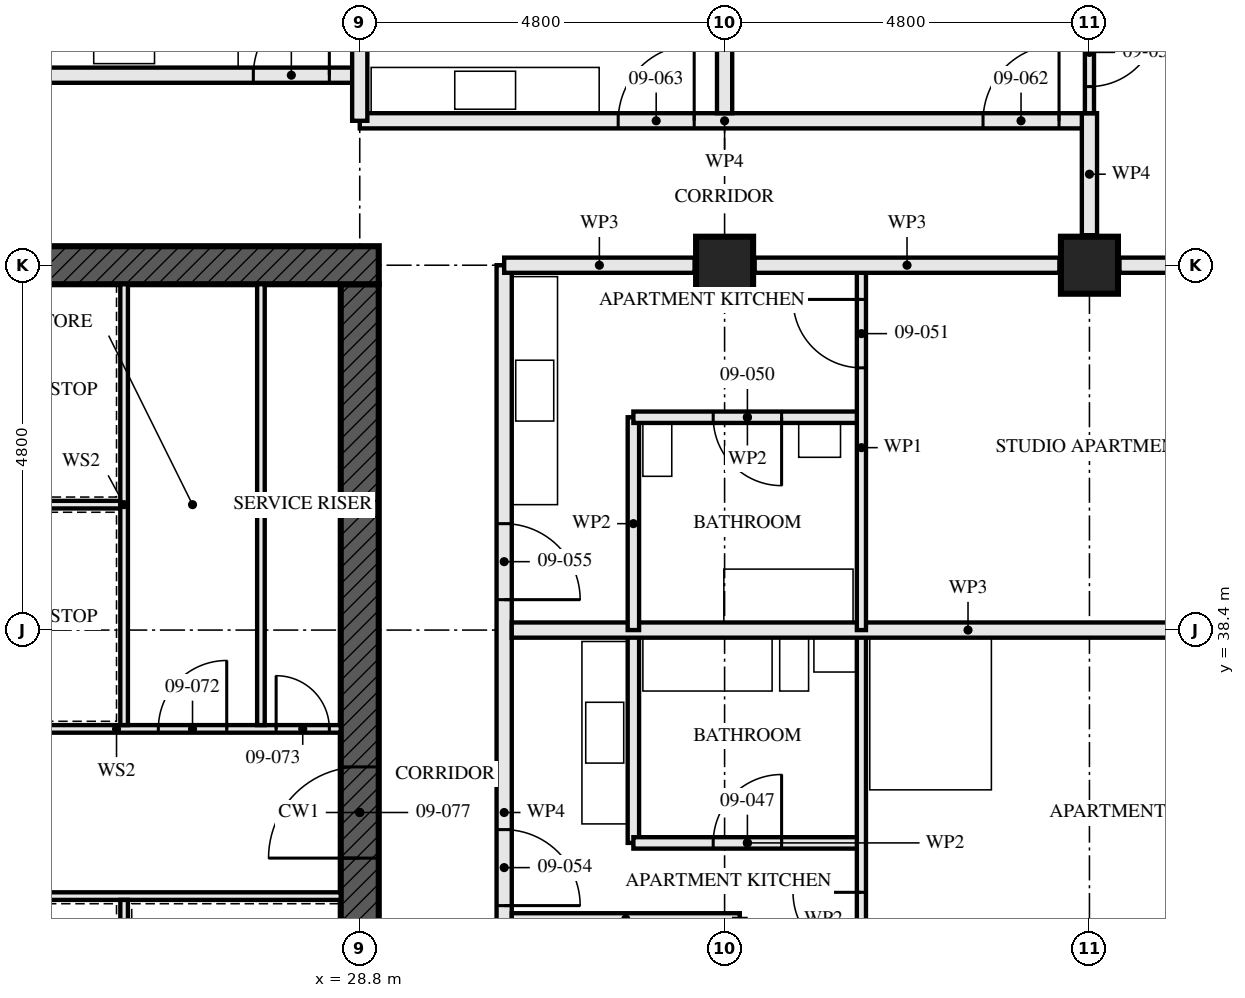
"""IFC4 building model, lengths in metres.
Left out: names, types, materials, properties, quantities, classifications, styles, units other than length and angle.
Written with IfcOpenShell. Run it as: python <this file> out.ifc"""

import sys

from ifc_helpers import new_model, si_unit, direction, frame, frame_2d, origin, origin_2d, place, context, subcontext, project, spatial, rectangle, hollow_rectangle, extrude, element, fill, save


model = new_model("IFC4")
c1 = context("Model", 3, precision=1e-05, world=origin(), true_north=direction((0.0, 1.0)))
c2 = subcontext(c1, "Body", "Model", "MODEL_VIEW")
j1 = project(units=[si_unit("LENGTHUNIT", "METRE"), si_unit("PLANEANGLEUNIT", "RADIAN")], contexts=[c1])
p1 = place(None, origin())
s1 = spatial("IfcSite", under=j1, at=p1, CompositionType="ELEMENT")
p2 = place(p1, origin())
s2 = spatial("IfcBuilding", under=s1, at=p2, CompositionType="ELEMENT")
p3 = place(p2, frame((0.0, 0.0, 37.5)))
s3 = spatial("IfcBuildingStorey", under=s2, at=p3, CompositionType="ELEMENT", Elevation=37.5)
for number, where, z_axis, x_axis in (
    (1, (33.6, 43.2, 0.0), (0.0, 0.0, 1.0), (0.0, 1.0, 0.0)),
    (2, (38.4, 43.2, 0.0), (0.0, 0.0, 1.0), (0.0, 1.0, 0.0)),
):
    element("IfcColumn", number, at=place(p3, frame(where, z_axis=z_axis, x_axis=x_axis)), inside=s3, PredefinedType="COLUMN", context=c2, shape_type="SweptSolid", body=[
        extrude(hollow_rectangle(XDim=0.75, YDim=0.75, WallThickness=0.08, at=origin_2d()), origin(), (0.0, 0.0, 1.0), 3.5),
    ])
p4 = place(p3, frame((29.05, 43.2, -0.17), z_axis=(0.0, 0.0, 1.0), x_axis=(-1.0, 0.0, 0.0)))
e3 = element("IfcWall", 3, at=p4, inside=s3, PredefinedType="SHEAR", context=c2, shape_type="SweptSolid", body=[
    extrude(rectangle(XDim=14.9, YDim=0.5, at=frame_2d((7.45, 0.0))), origin(), (0.0, 0.0, 1.0), 3.5),
])
p5 = place(p4, frame((6.85, 0.0, 0.17)))
e4 = element("IfcOpeningElement", 4, at=p5, cuts=e3, PredefinedType="OPENING", context=c2, shape_type="SweptSolid", body=[
    extrude(rectangle(XDim=1.2, YDim=2.1, at=frame_2d((0.6, 1.05))), frame((0.0, 0.26, 0.0), z_axis=(0.0, -1.0, 0.0), x_axis=(1.0, 0.0, 0.0)), (0.0, 0.0, 1.0), 0.521),
])
p6 = place(p3, frame((28.8, 29.05, -0.17), z_axis=(0.0, 0.0, 1.0), x_axis=(0.0, 1.0, 0.0)))
e5 = element("IfcWall", 5, at=p6, inside=s3, PredefinedType="SHEAR", context=c2, shape_type="SweptSolid", body=[
    extrude(rectangle(XDim=13.9, YDim=0.5, at=frame_2d((6.95, 0.0))), origin(), (0.0, 0.0, 1.0), 3.5),
])
p7 = place(p6, frame((6.35, 0.0, 0.17)))
e6 = element("IfcOpeningElement", 6, at=p7, cuts=e5, PredefinedType="OPENING", context=c2, shape_type="SweptSolid", body=[
    extrude(rectangle(XDim=1.2, YDim=2.1, at=frame_2d((0.6, 1.05))), frame((0.0, 0.26, 0.0), z_axis=(0.0, -1.0, 0.0), x_axis=(1.0, 0.0, 0.0)), (0.0, 0.0, 1.0), 0.521),
])
p8 = place(p3, frame((28.8, 45.7, 0.0), z_axis=(0.0, 0.0, 1.0), x_axis=(-1.0, 0.0, 0.0)))
e7 = element("IfcWall", 7, at=p8, inside=s3, PredefinedType="PARTITIONING", context=c2, shape_type="SweptSolid", body=[
    extrude(rectangle(XDim=14.4, YDim=0.2, at=frame_2d((7.2, 0.0))), origin(), (0.0, 0.0, 1.0), 3.33),
])
p9 = place(p8, frame((0.4, 0.0, 0.0)))
e8 = element("IfcOpeningElement", 8, at=p9, cuts=e7, PredefinedType="OPENING", context=c2, shape_type="SweptSolid", body=[
    extrude(rectangle(XDim=1.0, YDim=2.1, at=frame_2d((0.5, 1.05))), frame((0.0, 0.111, 0.0), z_axis=(0.0, -1.0, 0.0), x_axis=(1.0, 0.0, 0.0)), (0.0, 0.0, 1.0), 0.221),
])
p10 = place(p3, frame((33.8, 32.2, 0.0), z_axis=(0.0, 0.0, 1.0), x_axis=(0.0, 1.0, 0.0)))
e9 = element("IfcWall", 9, at=p10, inside=s3, PredefinedType="PARTITIONING", context=c2, shape_type="SweptSolid", body=[
    extrude(rectangle(XDim=2.4, YDim=0.15, at=frame_2d((1.2, 0.0))), origin(), (0.0, 0.0, 1.0), 2.55),
])
p11 = place(p3, frame((33.8, 34.6, 0.0), z_axis=(0.0, 0.0, 1.0), x_axis=(-1.0, 0.0, 0.0)))
e10 = element("IfcWall", 10, at=p11, inside=s3, PredefinedType="PARTITIONING", context=c2, shape_type="SweptSolid", body=[
    extrude(rectangle(XDim=3.0, YDim=0.15, at=frame_2d((1.5, 0.0))), origin(), (0.0, 0.0, 1.0), 3.33),
])
p12 = place(p3, frame((35.4, 35.6, 0.0), z_axis=(0.0, 0.0, 1.0), x_axis=(-1.0, 0.0, 0.0)))
e11 = element("IfcWall", 11, at=p12, inside=s3, PredefinedType="PARTITIONING", context=c2, shape_type="SweptSolid", body=[
    extrude(rectangle(XDim=3.0, YDim=0.15, at=frame_2d((1.5, 0.0))), origin(), (0.0, 0.0, 1.0), 3.33),
])
p13 = place(p12, frame((1.05, 0.0, 0.0)))
e12 = element("IfcOpeningElement", 12, at=p13, cuts=e11, PredefinedType="OPENING", context=c2, shape_type="SweptSolid", body=[
    extrude(rectangle(XDim=0.9, YDim=2.1, at=frame_2d((0.45, 1.05))), frame((0.0, 0.085, 0.0), z_axis=(0.0, -1.0, 0.0), x_axis=(1.0, 0.0, 0.0)), (0.0, 0.0, 1.0), 0.171),
])
p14 = place(p3, frame((32.4, 35.6, 0.0), z_axis=(0.0, 0.0, 1.0), x_axis=(0.0, 1.0, 0.0)))
e13 = element("IfcWall", 13, at=p14, inside=s3, PredefinedType="PARTITIONING", context=c2, shape_type="SweptSolid", body=[
    extrude(rectangle(XDim=2.8, YDim=0.15, at=frame_2d((1.4, 0.0))), origin(), (0.0, 0.0, 1.0), 3.33),
])
p15 = place(p3, frame((35.4, 33.6, 0.0), z_axis=(0.0, 0.0, 1.0), x_axis=(0.0, 1.0, 0.0)))
e14 = element("IfcWall", 14, at=p15, inside=s3, PredefinedType="PARTITIONING", context=c2, shape_type="SweptSolid", body=[
    extrude(rectangle(XDim=4.8, YDim=0.12, at=frame_2d((2.4, 0.0))), origin(), (0.0, 0.0, 1.0), 3.33),
])
p16 = place(p15, frame((0.45, 0.0, 0.0)))
e15 = element("IfcOpeningElement", 15, at=p16, cuts=e14, PredefinedType="OPENING", context=c2, shape_type="SweptSolid", body=[
    extrude(rectangle(XDim=0.9, YDim=2.1, at=frame_2d((0.45, 1.05))), frame((0.0, 0.071, 0.0), z_axis=(0.0, -1.0, 0.0), x_axis=(1.0, 0.0, 0.0)), (0.0, 0.0, 1.0), 0.141),
])
p17 = place(p3, frame((42.805, 38.4, 0.0), z_axis=(0.0, 0.0, 1.0), x_axis=(-1.0, 0.0, 0.0)))
e16 = element("IfcWall", 16, at=p17, inside=s3, PredefinedType="PARTITIONING", context=c2, shape_type="SweptSolid", body=[
    extrude(rectangle(XDim=12.005, YDim=0.2, at=frame_2d((6.002, 0.0))), origin(), (0.0, 0.0, 1.0), 2.55),
])
p18 = place(p3, frame((35.4, 41.2, 0.0), z_axis=(0.0, 0.0, 1.0), x_axis=(-1.0, 0.0, 0.0)))
e17 = element("IfcWall", 17, at=p18, inside=s3, PredefinedType="PARTITIONING", context=c2, shape_type="SweptSolid", body=[
    extrude(rectangle(XDim=3.0, YDim=0.15, at=frame_2d((1.5, 0.0))), origin(), (0.0, 0.0, 1.0), 3.33),
])
p19 = place(p18, frame((1.05, 0.0, 0.0)))
e18 = element("IfcOpeningElement", 18, at=p19, cuts=e17, PredefinedType="OPENING", context=c2, shape_type="SweptSolid", body=[
    extrude(rectangle(XDim=0.9, YDim=2.1, at=frame_2d((0.45, 1.05))), frame((0.0, 0.085, 0.0), z_axis=(0.0, -1.0, 0.0), x_axis=(1.0, 0.0, 0.0)), (0.0, 0.0, 1.0), 0.171),
])
p20 = place(p3, frame((32.4, 38.4, 0.0), z_axis=(0.0, 0.0, 1.0), x_axis=(0.0, 1.0, 0.0)))
e19 = element("IfcWall", 19, at=p20, inside=s3, PredefinedType="PARTITIONING", context=c2, shape_type="SweptSolid", body=[
    extrude(rectangle(XDim=2.8, YDim=0.15, at=frame_2d((1.4, 0.0))), origin(), (0.0, 0.0, 1.0), 3.33),
])
p21 = place(p3, frame((35.4, 38.4, 0.0), z_axis=(0.0, 0.0, 1.0), x_axis=(0.0, 1.0, 0.0)))
e20 = element("IfcWall", 20, at=p21, inside=s3, PredefinedType="PARTITIONING", context=c2, shape_type="SweptSolid", body=[
    extrude(rectangle(XDim=4.8, YDim=0.12, at=frame_2d((2.4, 0.0))), origin(), (0.0, 0.0, 1.0), 3.33),
])
p22 = place(p21, frame((3.45, 0.0, 0.0)))
e21 = element("IfcOpeningElement", 21, at=p22, cuts=e20, PredefinedType="OPENING", context=c2, shape_type="SweptSolid", body=[
    extrude(rectangle(XDim=0.9, YDim=2.1, at=frame_2d((0.45, 1.05))), frame((0.0, 0.071, 0.0), z_axis=(0.0, -1.0, 0.0), x_axis=(1.0, 0.0, 0.0)), (0.0, 0.0, 1.0), 0.141),
])
p23 = place(p3, frame((30.7, 28.8, 0.0), z_axis=(0.0, 0.0, 1.0), x_axis=(0.0, 1.0, 0.0)))
e22 = element("IfcWall", 22, at=p23, inside=s3, PredefinedType="PARTITIONING", context=c2, shape_type="SweptSolid", body=[
    extrude(rectangle(XDim=14.4, YDim=0.2, at=frame_2d((7.2, 0.0))), origin(), (0.0, 0.0, 1.0), 2.55),
])
p24 = place(p23, frame((1.4, 0.0, 0.0)))
e23 = element("IfcOpeningElement", 23, at=p24, cuts=e22, PredefinedType="OPENING", context=c2, shape_type="SweptSolid", body=[
    extrude(rectangle(XDim=1.0, YDim=2.1, at=frame_2d((0.5, 1.05))), frame((0.0, 0.111, 0.0), z_axis=(0.0, -1.0, 0.0), x_axis=(1.0, 0.0, 0.0)), (0.0, 0.0, 1.0), 0.221),
])
p25 = place(p23, frame((4.1, 0.0, 0.0)))
e24 = element("IfcOpeningElement", 24, at=p25, cuts=e22, PredefinedType="OPENING", context=c2, shape_type="SweptSolid", body=[
    extrude(rectangle(XDim=1.0, YDim=2.1, at=frame_2d((0.5, 1.05))), frame((0.0, 0.111, 0.0), z_axis=(0.0, -1.0, 0.0), x_axis=(1.0, 0.0, 0.0)), (0.0, 0.0, 1.0), 0.221),
])
p26 = place(p23, frame((5.975, 0.0, 0.0)))
e25 = element("IfcOpeningElement", 25, at=p26, cuts=e22, PredefinedType="OPENING", context=c2, shape_type="SweptSolid", body=[
    extrude(rectangle(XDim=1.0, YDim=2.1, at=frame_2d((0.5, 1.05))), frame((0.0, 0.111, 0.0), z_axis=(0.0, -1.0, 0.0), x_axis=(1.0, 0.0, 0.0)), (0.0, 0.0, 1.0), 0.221),
])
p27 = place(p23, frame((10.0, 0.0, 0.0)))
e26 = element("IfcOpeningElement", 26, at=p27, cuts=e22, PredefinedType="OPENING", context=c2, shape_type="SweptSolid", body=[
    extrude(rectangle(XDim=1.0, YDim=2.1, at=frame_2d((0.5, 1.05))), frame((0.0, 0.111, 0.0), z_axis=(0.0, -1.0, 0.0), x_axis=(1.0, 0.0, 0.0)), (0.0, 0.0, 1.0), 0.221),
])
p28 = place(p3, frame((38.4, 48.2, 0.0), z_axis=(0.0, 0.0, 1.0), x_axis=(0.0, -1.0, 0.0)))
e27 = element("IfcWall", 27, at=p28, inside=s3, PredefinedType="PARTITIONING", context=c2, shape_type="SweptSolid", body=[
    extrude(rectangle(XDim=3.0, YDim=0.12, at=frame_2d((1.5, 0.0))), origin(), (0.0, 0.0, 1.0), 2.55),
])
p29 = place(p28, frame((1.75, 0.0, 0.0)))
e28 = element("IfcOpeningElement", 28, at=p29, cuts=e27, PredefinedType="OPENING", context=c2, shape_type="SweptSolid", body=[
    extrude(rectangle(XDim=0.9, YDim=2.1, at=frame_2d((0.45, 1.05))), frame((0.0, 0.071, 0.0), z_axis=(0.0, -1.0, 0.0), x_axis=(1.0, 0.0, 0.0)), (0.0, 0.0, 1.0), 0.141),
])
p30 = place(p3, frame((33.6, 57.353, 0.0), z_axis=(0.0, 0.0, 1.0), x_axis=(0.0, -1.0, 0.0)))
e29 = element("IfcWall", 29, at=p30, inside=s3, PredefinedType="PARTITIONING", context=c2, shape_type="SweptSolid", body=[
    extrude(rectangle(XDim=12.153, YDim=0.2, at=frame_2d((6.077, 0.0))), origin(), (0.0, 0.0, 1.0), 2.55),
])
p31 = place(p3, frame((38.4, 45.1, 0.0), z_axis=(0.0, 0.0, 1.0), x_axis=(-1.0, 0.0, 0.0)))
e30 = element("IfcWall", 30, at=p31, inside=s3, PredefinedType="PARTITIONING", context=c2, shape_type="SweptSolid", body=[
    extrude(rectangle(XDim=9.6, YDim=0.2, at=frame_2d((4.8, 0.0))), origin(), (0.0, 0.0, 1.0), 3.33),
])
p32 = place(p31, frame((0.4, 0.0, 0.0)))
e31 = element("IfcOpeningElement", 31, at=p32, cuts=e30, PredefinedType="OPENING", context=c2, shape_type="SweptSolid", body=[
    extrude(rectangle(XDim=1.0, YDim=2.1, at=frame_2d((0.5, 1.05))), frame((0.0, 0.111, 0.0), z_axis=(0.0, -1.0, 0.0), x_axis=(1.0, 0.0, 0.0)), (0.0, 0.0, 1.0), 0.221),
])
p33 = place(p31, frame((5.2, 0.0, 0.0)))
e32 = element("IfcOpeningElement", 32, at=p33, cuts=e30, PredefinedType="OPENING", context=c2, shape_type="SweptSolid", body=[
    extrude(rectangle(XDim=1.0, YDim=2.1, at=frame_2d((0.5, 1.05))), frame((0.0, 0.111, 0.0), z_axis=(0.0, -1.0, 0.0), x_axis=(1.0, 0.0, 0.0)), (0.0, 0.0, 1.0), 0.221),
])
p34 = place(p3, frame((38.4, 45.2, 0.0), z_axis=(0.0, 0.0, 1.0), x_axis=(0.0, -1.0, 0.0)))
e33 = element("IfcWall", 33, at=p34, inside=s3, PredefinedType="PARTITIONING", context=c2, shape_type="SweptSolid", body=[
    extrude(rectangle(XDim=1.605, YDim=0.2, at=frame_2d((0.802, 0.0))), origin(), (0.0, 0.0, 1.0), 3.33),
])
p35 = place(p3, frame((27.5, 37.15, 0.0), z_axis=(0.0, 0.0, 1.0), x_axis=(0.0, 1.0, 0.0)))
e34 = element("IfcWall", 34, at=p35, inside=s3, PredefinedType="SOLIDWALL", context=c2, shape_type="SweptSolid", body=[
    extrude(rectangle(XDim=5.8, YDim=0.1, at=frame_2d((2.9, 0.0))), origin(), (0.0, 0.0, 1.0), 3.33),
])
p36 = place(p3, frame((23.05, 34.9, 0.0), z_axis=(0.0, 0.0, 1.0), x_axis=(1.0, 0.0, 0.0)))
e35 = element("IfcWall", 35, at=p36, inside=s3, PredefinedType="SOLIDWALL", context=c2, shape_type="SweptSolid", body=[
    extrude(rectangle(XDim=5.5, YDim=0.1, at=frame_2d((2.75, 0.0))), origin(), (0.0, 0.0, 1.0), 3.33),
])
p37 = place(p3, frame((22.65, 37.1, 0.0), z_axis=(0.0, 0.0, 1.0), x_axis=(1.0, 0.0, 0.0)))
e36 = element("IfcWall", 36, at=p37, inside=s3, PredefinedType="SOLIDWALL", context=c2, shape_type="SweptSolid", body=[
    extrude(rectangle(XDim=5.9, YDim=0.1, at=frame_2d((2.95, 0.0))), origin(), (0.0, 0.0, 1.0), 3.33),
])
p38 = place(p37, frame((3.5, 0.0, 0.0)))
e37 = element("IfcOpeningElement", 37, at=p38, cuts=e36, PredefinedType="OPENING", context=c2, shape_type="SweptSolid", body=[
    extrude(rectangle(XDim=0.9, YDim=2.1, at=frame_2d((0.45, 1.05))), frame((0.0, 0.061, 0.0), z_axis=(0.0, -1.0, 0.0), x_axis=(1.0, 0.0, 0.0)), (0.0, 0.0, 1.0), 0.121),
])
p39 = place(p37, frame((5.05, 0.0, 0.0)))
e38 = element("IfcOpeningElement", 38, at=p39, cuts=e36, PredefinedType="OPENING", context=c2, shape_type="SweptSolid", body=[
    extrude(rectangle(XDim=0.7, YDim=2.1, at=frame_2d((0.35, 1.05))), frame((0.0, 0.061, 0.0), z_axis=(0.0, -1.0, 0.0), x_axis=(1.0, 0.0, 0.0)), (0.0, 0.0, 1.0), 0.121),
])
p40 = place(p3, frame((22.75, 40.05, 0.0), z_axis=(0.0, 0.0, 1.0), x_axis=(1.0, 0.0, 0.0)))
e39 = element("IfcWall", 39, at=p40, inside=s3, PredefinedType="SOLIDWALL", context=c2, shape_type="SweptSolid", body=[
    extrude(rectangle(XDim=2.9, YDim=0.1, at=frame_2d((1.45, 0.0))), origin(), (0.0, 0.0, 1.0), 3.33),
])
p41 = place(p3, frame((25.7, 37.15, 0.0), z_axis=(0.0, 0.0, 1.0), x_axis=(0.0, 1.0, 0.0)))
e40 = element("IfcWall", 40, at=p41, inside=s3, PredefinedType="SOLIDWALL", context=c2, shape_type="SweptSolid", body=[
    extrude(rectangle(XDim=5.8, YDim=0.1, at=frame_2d((2.9, 0.0))), origin(), (0.0, 0.0, 1.0), 3.33),
])
p42 = place(p3, frame((25.7, 31.95, 0.0), z_axis=(0.0, 0.0, 1.0), x_axis=(0.0, 1.0, 0.0)))
e41 = element("IfcWall", 41, at=p42, inside=s3, PredefinedType="SOLIDWALL", context=c2, shape_type="SweptSolid", body=[
    extrude(rectangle(XDim=2.9, YDim=0.1, at=frame_2d((1.45, 0.0))), origin(), (0.0, 0.0, 1.0), 3.33),
])
p43 = place(p3, frame((28.8, 45.1, 0.0), z_axis=(0.0, 0.0, 1.0), x_axis=(0.0, 1.0, 0.0)))
e42 = element("IfcWall", 42, at=p43, inside=s3, PredefinedType="PARTITIONING", context=c2, shape_type="SweptSolid", body=[
    extrude(rectangle(XDim=2.555, YDim=0.2, at=frame_2d((1.277, 0.0))), origin(), (0.0, 0.0, 1.0), 2.32),
])
p44 = place(p3, frame((42.896, 43.2, 0.0), z_axis=(0.0, 0.0, 1.0), x_axis=(-1.0, 0.0, 0.0)))
e43 = element("IfcWall", 43, at=p44, inside=s3, PredefinedType="PARTITIONING", context=c2, shape_type="SweptSolid", body=[
    extrude(rectangle(XDim=4.101, YDim=0.2, at=frame_2d((2.05, 0.0))), origin(), (0.0, 0.0, 1.0), 2.32),
])
p45 = place(p3, frame((38.005, 43.2, 0.0), z_axis=(0.0, 0.0, 1.0), x_axis=(-1.0, 0.0, 0.0)))
e44 = element("IfcWall", 44, at=p45, inside=s3, PredefinedType="PARTITIONING", context=c2, shape_type="SweptSolid", body=[
    extrude(rectangle(XDim=4.01, YDim=0.2, at=frame_2d((2.005, 0.0))), origin(), (0.0, 0.0, 1.0), 2.32),
])
p46 = place(p3, frame((33.205, 43.2, 0.0), z_axis=(0.0, 0.0, 1.0), x_axis=(-1.0, 0.0, 0.0)))
e45 = element("IfcWall", 45, at=p46, inside=s3, PredefinedType="PARTITIONING", context=c2, shape_type="SweptSolid", body=[
    extrude(rectangle(XDim=2.505, YDim=0.2, at=frame_2d((1.252, 0.0))), origin(), (0.0, 0.0, 1.0), 2.32),
])
p47 = place(p9, frame((1.0, 0.0, 0.0), z_axis=(0.0, 0.0, 1.0), x_axis=(-1.0, 0.0, 0.0)))
e46 = element("IfcDoor", 46, at=p47, inside=s3, OperationType="SINGLE_SWING_LEFT", PredefinedType="DOOR", context=c2, shape_type="SweptSolid", body=[
    extrude(rectangle(XDim=1.0, YDim=2.1, at=frame_2d((0.5, 1.05))), frame((0.0, 0.027, 0.0), z_axis=(0.0, -1.0, 0.0), x_axis=(1.0, 0.0, 0.0)), (0.0, 0.0, 1.0), 0.054),
])
fill(e8, e46)
p48 = place(p13, frame((0.9, 0.0, 0.0), z_axis=(0.0, 0.0, 1.0), x_axis=(-1.0, 0.0, 0.0)))
e47 = element("IfcDoor", 47, at=p48, inside=s3, OperationType="SINGLE_SWING_LEFT", PredefinedType="DOOR", context=c2, shape_type="SweptSolid", body=[
    extrude(rectangle(XDim=0.9, YDim=2.1, at=frame_2d((0.45, 1.05))), frame((0.0, 0.022, 0.0), z_axis=(0.0, -1.0, 0.0), x_axis=(1.0, 0.0, 0.0)), (0.0, 0.0, 1.0), 0.044),
])
fill(e12, e47)
p49 = place(p16, origin())
e48 = element("IfcDoor", 48, at=p49, inside=s3, OperationType="SINGLE_SWING_LEFT", PredefinedType="DOOR", context=c2, shape_type="SweptSolid", body=[
    extrude(rectangle(XDim=0.9, YDim=2.1, at=frame_2d((0.45, 1.05))), frame((0.0, 0.022, 0.0), z_axis=(0.0, -1.0, 0.0), x_axis=(1.0, 0.0, 0.0)), (0.0, 0.0, 1.0), 0.044),
])
fill(e15, e48)
p50 = place(p19, origin())
e49 = element("IfcDoor", 49, at=p50, inside=s3, OperationType="SINGLE_SWING_RIGHT", PredefinedType="DOOR", context=c2, shape_type="SweptSolid", body=[
    extrude(rectangle(XDim=0.9, YDim=2.1, at=frame_2d((0.45, 1.05))), frame((0.0, 0.022, 0.0), z_axis=(0.0, -1.0, 0.0), x_axis=(1.0, 0.0, 0.0)), (0.0, 0.0, 1.0), 0.044),
])
fill(e18, e49)
p51 = place(p22, origin())
e50 = element("IfcDoor", 50, at=p51, inside=s3, OperationType="SINGLE_SWING_LEFT", PredefinedType="DOOR", context=c2, shape_type="SweptSolid", body=[
    extrude(rectangle(XDim=0.9, YDim=2.1, at=frame_2d((0.45, 1.05))), frame((0.0, 0.022, 0.0), z_axis=(0.0, -1.0, 0.0), x_axis=(1.0, 0.0, 0.0)), (0.0, 0.0, 1.0), 0.044),
])
fill(e21, e50)
p52 = place(p26, frame((1.0, 0.0, 0.0), z_axis=(0.0, 0.0, 1.0), x_axis=(-1.0, 0.0, 0.0)))
e51 = element("IfcDoor", 51, at=p52, inside=s3, OperationType="SINGLE_SWING_LEFT", PredefinedType="DOOR", context=c2, shape_type="SweptSolid", body=[
    extrude(rectangle(XDim=1.0, YDim=2.1, at=frame_2d((0.5, 1.05))), frame((0.0, 0.027, 0.0), z_axis=(0.0, -1.0, 0.0), x_axis=(1.0, 0.0, 0.0)), (0.0, 0.0, 1.0), 0.054),
])
fill(e25, e51)
p53 = place(p27, frame((1.0, 0.0, 0.0), z_axis=(0.0, 0.0, 1.0), x_axis=(-1.0, 0.0, 0.0)))
e52 = element("IfcDoor", 52, at=p53, inside=s3, OperationType="SINGLE_SWING_LEFT", PredefinedType="DOOR", context=c2, shape_type="SweptSolid", body=[
    extrude(rectangle(XDim=1.0, YDim=2.1, at=frame_2d((0.5, 1.05))), frame((0.0, 0.027, 0.0), z_axis=(0.0, -1.0, 0.0), x_axis=(1.0, 0.0, 0.0)), (0.0, 0.0, 1.0), 0.054),
])
fill(e26, e52)
p54 = place(p29, origin())
e53 = element("IfcDoor", 53, at=p54, inside=s3, OperationType="SINGLE_SWING_RIGHT", PredefinedType="DOOR", context=c2, shape_type="SweptSolid", body=[
    extrude(rectangle(XDim=0.9, YDim=2.1, at=frame_2d((0.45, 1.05))), frame((0.0, 0.022, 0.0), z_axis=(0.0, -1.0, 0.0), x_axis=(1.0, 0.0, 0.0)), (0.0, 0.0, 1.0), 0.044),
])
fill(e28, e53)
p55 = place(p32, frame((1.0, 0.0, 0.0), z_axis=(0.0, 0.0, 1.0), x_axis=(-1.0, 0.0, 0.0)))
e54 = element("IfcDoor", 54, at=p55, inside=s3, OperationType="SINGLE_SWING_LEFT", PredefinedType="DOOR", context=c2, shape_type="SweptSolid", body=[
    extrude(rectangle(XDim=1.0, YDim=2.1, at=frame_2d((0.5, 1.05))), frame((0.0, 0.027, 0.0), z_axis=(0.0, -1.0, 0.0), x_axis=(1.0, 0.0, 0.0)), (0.0, 0.0, 1.0), 0.054),
])
fill(e31, e54)
p56 = place(p33, frame((1.0, 0.0, 0.0), z_axis=(0.0, 0.0, 1.0), x_axis=(-1.0, 0.0, 0.0)))
e55 = element("IfcDoor", 55, at=p56, inside=s3, OperationType="SINGLE_SWING_LEFT", PredefinedType="DOOR", context=c2, shape_type="SweptSolid", body=[
    extrude(rectangle(XDim=1.0, YDim=2.1, at=frame_2d((0.5, 1.05))), frame((0.0, 0.027, 0.0), z_axis=(0.0, -1.0, 0.0), x_axis=(1.0, 0.0, 0.0)), (0.0, 0.0, 1.0), 0.054),
])
fill(e32, e55)
p57 = place(p38, origin())
e56 = element("IfcDoor", 56, at=p57, inside=s3, OperationType="SINGLE_SWING_LEFT", PredefinedType="DOOR", context=c2, shape_type="SweptSolid", body=[
    extrude(rectangle(XDim=0.9, YDim=2.1, at=frame_2d((0.45, 1.05))), frame((0.0, 0.027, 0.0), z_axis=(0.0, -1.0, 0.0), x_axis=(1.0, 0.0, 0.0)), (0.0, 0.0, 1.0), 0.054),
])
fill(e37, e56)
p58 = place(p39, origin())
e57 = element("IfcDoor", 57, at=p58, inside=s3, OperationType="SINGLE_SWING_RIGHT", PredefinedType="DOOR", context=c2, shape_type="SweptSolid", body=[
    extrude(rectangle(XDim=0.7, YDim=2.1, at=frame_2d((0.35, 1.05))), frame((0.0, 0.027, 0.0), z_axis=(0.0, -1.0, 0.0), x_axis=(1.0, 0.0, 0.0)), (0.0, 0.0, 1.0), 0.054),
])
fill(e38, e57)
p59 = place(p7, origin())
e58 = element("IfcDoor", 58, at=p59, inside=s3, OperationType="SINGLE_SWING_LEFT", PredefinedType="DOOR", context=c2, shape_type="SweptSolid", body=[
    extrude(rectangle(XDim=1.2, YDim=2.1, at=frame_2d((0.6, 1.05))), frame((0.0, 0.027, 0.0), z_axis=(0.0, -1.0, 0.0), x_axis=(1.0, 0.0, 0.0)), (0.0, 0.0, 1.0), 0.054),
])
fill(e6, e58)
save(model, sys.argv[1])
